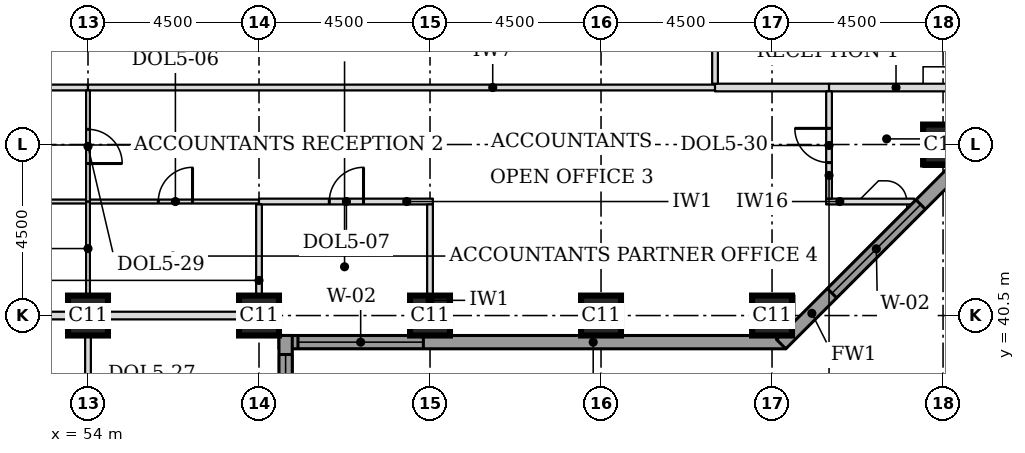
"""IFC4 building model, lengths in metres.
Left out: names, types, materials, properties, quantities, classifications, styles, units other than length and angle.
Written with IfcOpenShell. Run it as: python <this file> out.ifc"""

import sys

from ifc_helpers import new_model, si_unit, direction, frame, frame_2d, origin, origin_2d, place, context, subcontext, project, spatial, rectangle, extrude, element, fill, save


model = new_model("IFC4")
c1 = context("Model", 3, precision=1e-05, world=origin(), true_north=direction((0.0, 1.0)))
c2 = subcontext(c1, "Body", "Model", "MODEL_VIEW")
j1 = project(units=[si_unit("LENGTHUNIT", "METRE"), si_unit("PLANEANGLEUNIT", "RADIAN")], contexts=[c1])
p1 = place(None, origin())
s1 = spatial("IfcSite", under=j1, at=p1, CompositionType="ELEMENT")
p2 = place(p1, origin())
s2 = spatial("IfcBuilding", under=s1, at=p2, CompositionType="ELEMENT")
p3 = place(p2, frame((0.0, 0.0, 108.5)))
s3 = spatial("IfcBuildingStorey", under=s2, at=p3, CompositionType="ELEMENT", Elevation=108.5)
for number, where, z_axis, x_axis in (
    (1, (54.0, 40.5, 0.0), (0.0, 0.0, 1.0), (1.0, 0.0, 0.0)),
    (2, (58.5, 40.5, 0.0), (0.0, 0.0, 1.0), (1.0, 0.0, 0.0)),
    (3, (63.0, 40.5, 0.0), (0.0, 0.0, 1.0), (1.0, 0.0, 0.0)),
    (4, (67.5, 40.5, 0.0), (0.0, 0.0, 1.0), (1.0, 0.0, 0.0)),
    (5, (72.0, 40.5, 0.0), (0.0, 0.0, 1.0), (1.0, 0.0, 0.0)),
    (6, (76.5, 45.0, 0.0), (0.0, 0.0, 1.0), (1.0, 0.0, 0.0)),
):
    element("IfcColumn", number, at=place(p3, frame(where, z_axis=z_axis, x_axis=x_axis)), inside=s3, PredefinedType="COLUMN", context=c2, shape_type="SweptSolid", body=[
        extrude(rectangle(XDim=1.05, YDim=1.05, at=origin_2d()), origin(), (0.0, 0.0, 1.0), 3.7),
    ])
p4 = place(p3, frame((59.025, 39.8, 0.0), z_axis=(0.0, 0.0, 1.0), x_axis=(1.0, 0.0, 0.0)))
e7 = element("IfcWall", 7, at=p4, inside=s3, PredefinedType="STANDARD", context=c2, shape_type="SweptSolid", body=[
    extrude(rectangle(XDim=13.337, YDim=0.35, at=frame_2d((6.669, 0.0))), origin(), (0.0, 0.0, 1.0), 3.525),
])
p5 = place(p4, frame((0.5, 0.0, 0.9)))
e8 = element("IfcOpeningElement", 8, at=p5, cuts=e7, PredefinedType="OPENING", context=c2, shape_type="SweptSolid", body=[
    extrude(rectangle(XDim=3.3, YDim=1.9, at=frame_2d((1.65, 0.95))), frame((0.0, 0.185, 0.0), z_axis=(0.0, -1.0, 0.0), x_axis=(1.0, 0.0, 0.0)), (0.0, 0.0, 1.0), 0.37),
])
p6 = place(p3, frame((72.239, 39.749, 0.0), z_axis=(0.0, 0.0, 1.0), x_axis=(0.707106781187, 0.707106781187, 0.0)))
e9 = element("IfcWall", 9, at=p6, inside=s3, PredefinedType="STANDARD", context=c2, shape_type="SweptSolid", body=[
    extrude(rectangle(XDim=7.089, YDim=0.35, at=frame_2d((3.544, 0.0))), origin(), (0.0, 0.0, 1.0), 3.525),
])
p7 = place(p6, frame((1.894, 0.0, 0.9)))
e10 = element("IfcOpeningElement", 10, at=p7, cuts=e9, PredefinedType="OPENING", context=c2, shape_type="SweptSolid", body=[
    extrude(rectangle(XDim=3.3, YDim=1.9, at=frame_2d((1.65, 0.95))), frame((0.0, 0.185, 0.0), z_axis=(0.0, -1.0, 0.0), x_axis=(1.0, 0.0, 0.0)), (0.0, 0.0, 1.0), 0.37),
])
p8 = place(p3, frame((59.2, 22.138, 0.0), z_axis=(0.0, 0.0, 1.0), x_axis=(0.0, 1.0, 0.0)))
e11 = element("IfcWall", 11, at=p8, inside=s3, PredefinedType="STANDARD", context=c2, shape_type="SweptSolid", body=[
    extrude(rectangle(XDim=17.837, YDim=0.35, at=frame_2d((8.919, 0.0))), origin(), (0.0, 0.0, 1.0), 3.525),
])
p9 = place(p8, frame((5.462, 0.0, 0.9)))
e12 = element("IfcOpeningElement", 12, at=p9, cuts=e11, PredefinedType="OPENING", context=c2, shape_type="SweptSolid", body=[
    extrude(rectangle(XDim=3.3, YDim=1.9, at=frame_2d((1.65, 0.95))), frame((0.0, 0.185, 0.0), z_axis=(0.0, -1.0, 0.0), x_axis=(1.0, 0.0, 0.0)), (0.0, 0.0, 1.0), 0.37),
])
p10 = place(p8, frame((14.037, 0.0, 0.9)))
e13 = element("IfcOpeningElement", 13, at=p10, cuts=e11, PredefinedType="OPENING", context=c2, shape_type="SweptSolid", body=[
    extrude(rectangle(XDim=3.3, YDim=1.9, at=frame_2d((1.65, 0.95))), frame((0.0, 0.185, 0.0), z_axis=(0.0, -1.0, 0.0), x_axis=(1.0, 0.0, 0.0)), (0.0, 0.0, 1.0), 0.37),
])
p11 = place(p3, frame((50.015, 40.5, 0.0), z_axis=(0.0, 0.0, 1.0), x_axis=(1.0, 0.0, 0.0)))
e14 = element("IfcWall", 14, at=p11, inside=s3, PredefinedType="PARTITIONING", context=c2, shape_type="SweptSolid", body=[
    extrude(rectangle(XDim=3.46, YDim=0.2, at=frame_2d((1.73, 0.0))), origin(), (0.0, 0.0, 1.0), 2.8),
])
p12 = place(p3, frame((54.495, 40.5, 0.0), z_axis=(0.0, 0.0, 1.0), x_axis=(1.0, 0.0, 0.0)))
e15 = element("IfcWall", 15, at=p12, inside=s3, PredefinedType="PARTITIONING", context=c2, shape_type="SweptSolid", body=[
    extrude(rectangle(XDim=3.48, YDim=0.2, at=frame_2d((1.74, 0.0))), origin(), (0.0, 0.0, 1.0), 2.8),
])
p13 = place(p3, frame((49.575, 43.5, 0.0), z_axis=(0.0, 0.0, 1.0), x_axis=(1.0, 0.0, 0.0)))
e16 = element("IfcWall", 16, at=p13, inside=s3, PredefinedType="PARTITIONING", context=c2, shape_type="SweptSolid", body=[
    extrude(rectangle(XDim=4.375, YDim=0.1, at=frame_2d((2.188, 0.0))), origin(), (0.0, 0.0, 1.0), 3.55),
])
p14 = place(p13, frame((1.75, 0.0, 0.0)))
e17 = element("IfcOpeningElement", 17, at=p14, cuts=e16, PredefinedType="OPENING", context=c2, shape_type="SweptSolid", body=[
    extrude(rectangle(XDim=0.9, YDim=2.1, at=frame_2d((0.45, 1.05))), frame((0.0, 0.06, 0.0), z_axis=(0.0, -1.0, 0.0), x_axis=(1.0, 0.0, 0.0)), (0.0, 0.0, 1.0), 0.12),
])
p15 = place(p3, frame((54.05, 43.5, 0.0), z_axis=(0.0, 0.0, 1.0), x_axis=(1.0, 0.0, 0.0)))
e18 = element("IfcWall", 18, at=p15, inside=s3, PredefinedType="PARTITIONING", context=c2, shape_type="SweptSolid", body=[
    extrude(rectangle(XDim=4.45, YDim=0.1, at=frame_2d((2.225, 0.0))), origin(), (0.0, 0.0, 1.0), 3.55),
])
p16 = place(p15, frame((1.8, 0.0, 0.0)))
e19 = element("IfcOpeningElement", 19, at=p16, cuts=e18, PredefinedType="OPENING", context=c2, shape_type="SweptSolid", body=[
    extrude(rectangle(XDim=0.9, YDim=2.1, at=frame_2d((0.45, 1.05))), frame((0.0, 0.06, 0.0), z_axis=(0.0, -1.0, 0.0), x_axis=(1.0, 0.0, 0.0)), (0.0, 0.0, 1.0), 0.12),
])
p17 = place(p3, frame((58.5, 43.5, 0.0), z_axis=(0.0, 0.0, 1.0), x_axis=(1.0, 0.0, 0.0)))
e20 = element("IfcWall", 20, at=p17, inside=s3, PredefinedType="PARTITIONING", context=c2, shape_type="SweptSolid", body=[
    extrude(rectangle(XDim=4.575, YDim=0.15, at=frame_2d((2.288, 0.0))), origin(), (0.0, 0.0, 1.0), 3.55),
])
p18 = place(p17, frame((1.85, 0.0, 0.0)))
e21 = element("IfcOpeningElement", 21, at=p18, cuts=e20, PredefinedType="OPENING", context=c2, shape_type="SweptSolid", body=[
    extrude(rectangle(XDim=0.9, YDim=2.1, at=frame_2d((0.45, 1.05))), frame((0.0, 0.085, 0.0), z_axis=(0.0, -1.0, 0.0), x_axis=(1.0, 0.0, 0.0)), (0.0, 0.0, 1.0), 0.17),
])
p19 = place(p3, frame((73.425, 43.5, 0.0), z_axis=(0.0, 0.0, 1.0), x_axis=(1.0, 0.0, 0.0)))
e22 = element("IfcWall", 22, at=p19, inside=s3, PredefinedType="PARTITIONING", context=c2, shape_type="SweptSolid", body=[
    extrude(rectangle(XDim=2.317, YDim=0.15, at=frame_2d((1.159, 0.0))), origin(), (0.0, 0.0, 1.0), 3.55),
])
p20 = place(p3, frame((49.425, 46.5, 0.0), z_axis=(0.0, 0.0, 1.0), x_axis=(1.0, 0.0, 0.0)))
e23 = element("IfcWall", 23, at=p20, inside=s3, PredefinedType="PARTITIONING", context=c2, shape_type="SweptSolid", body=[
    extrude(rectangle(XDim=4.575, YDim=0.15, at=frame_2d((2.288, 0.0))), origin(), (0.0, 0.0, 1.0), 3.55),
])
p21 = place(p20, frame((1.8, 0.0, 0.0)))
e24 = element("IfcOpeningElement", 24, at=p21, cuts=e23, PredefinedType="OPENING", context=c2, shape_type="SweptSolid", body=[
    extrude(rectangle(XDim=1.0, YDim=2.1, at=frame_2d((0.5, 1.05))), frame((0.0, 0.085, 0.0), z_axis=(0.0, -1.0, 0.0), x_axis=(1.0, 0.0, 0.0)), (0.0, 0.0, 1.0), 0.17),
])
p22 = place(p3, frame((54.0, 46.5, 0.0), z_axis=(0.0, 0.0, 1.0), x_axis=(1.0, 0.0, 0.0)))
e25 = element("IfcWall", 25, at=p22, inside=s3, PredefinedType="PARTITIONING", context=c2, shape_type="SweptSolid", body=[
    extrude(rectangle(XDim=16.5, YDim=0.15, at=frame_2d((8.25, 0.0))), origin(), (0.0, 0.0, 1.0), 3.55),
])
p23 = place(p3, frame((70.5, 46.5, 0.0), z_axis=(0.0, 0.0, 1.0), x_axis=(1.0, 0.0, 0.0)))
e26 = element("IfcWall", 26, at=p23, inside=s3, PredefinedType="PARTITIONING", context=c2, shape_type="SweptSolid", body=[
    extrude(rectangle(XDim=3.0, YDim=0.2, at=frame_2d((1.5, 0.0))), origin(), (0.0, 0.0, 1.0), 3.55),
])
p24 = place(p3, frame((73.5, 46.5, 0.0), z_axis=(0.0, 0.0, 1.0), x_axis=(1.0, 0.0, 0.0)))
e27 = element("IfcWall", 27, at=p24, inside=s3, PredefinedType="PARTITIONING", context=c2, shape_type="SweptSolid", body=[
    extrude(rectangle(XDim=3.525, YDim=0.2, at=frame_2d((1.762, 0.0))), origin(), (0.0, 0.0, 1.0), 3.55),
])
p25 = place(p3, frame((54.0, 36.0, 0.0), z_axis=(0.0, 0.0, 1.0), x_axis=(0.0, 1.0, 0.0)))
e28 = element("IfcWall", 28, at=p25, inside=s3, PredefinedType="PARTITIONING", context=c2, shape_type="SweptSolid", body=[
    extrude(rectangle(XDim=3.975, YDim=0.15, at=frame_2d((1.988, 0.0))), origin(), (0.0, 0.0, 1.0), 3.55),
])
p26 = place(p25, frame((1.55, 0.0, 0.0)))
e29 = element("IfcOpeningElement", 29, at=p26, cuts=e28, PredefinedType="OPENING", context=c2, shape_type="SweptSolid", body=[
    extrude(rectangle(XDim=0.9, YDim=2.1, at=frame_2d((0.45, 1.05))), frame((0.0, 0.085, 0.0), z_axis=(0.0, -1.0, 0.0), x_axis=(1.0, 0.0, 0.0)), (0.0, 0.0, 1.0), 0.17),
])
p27 = place(p3, frame((63.0, 39.975, 0.0), z_axis=(0.0, 0.0, 1.0), x_axis=(0.0, 1.0, 0.0)))
e30 = element("IfcWall", 30, at=p27, inside=s3, PredefinedType="PARTITIONING", context=c2, shape_type="SweptSolid", body=[
    extrude(rectangle(XDim=3.45, YDim=0.15, at=frame_2d((1.725, 0.0))), origin(), (0.0, 0.0, 1.0), 3.55),
])
p28 = place(p3, frame((54.0, 41.025, 0.0), z_axis=(0.0, 0.0, 1.0), x_axis=(0.0, 1.0, 0.0)))
e31 = element("IfcWall", 31, at=p28, inside=s3, PredefinedType="PARTITIONING", context=c2, shape_type="SweptSolid", body=[
    extrude(rectangle(XDim=2.475, YDim=0.1, at=frame_2d((1.238, 0.0))), origin(), (0.0, 0.0, 1.0), 3.55),
])
p29 = place(p3, frame((58.5, 41.025, 0.0), z_axis=(0.0, 0.0, 1.0), x_axis=(0.0, 1.0, 0.0)))
e32 = element("IfcWall", 32, at=p29, inside=s3, PredefinedType="PARTITIONING", context=c2, shape_type="SweptSolid", body=[
    extrude(rectangle(XDim=2.4, YDim=0.15, at=frame_2d((1.2, 0.0))), origin(), (0.0, 0.0, 1.0), 3.55),
])
p30 = place(p3, frame((54.0, 43.5, 0.0), z_axis=(0.0, 0.0, 1.0), x_axis=(0.0, 1.0, 0.0)))
e33 = element("IfcWall", 33, at=p30, inside=s3, PredefinedType="PARTITIONING", context=c2, shape_type="SweptSolid", body=[
    extrude(rectangle(XDim=2.925, YDim=0.1, at=frame_2d((1.462, 0.0))), origin(), (0.0, 0.0, 1.0), 3.55),
])
p31 = place(p30, frame((1.0, 0.0, 0.0)))
e34 = element("IfcOpeningElement", 34, at=p31, cuts=e33, PredefinedType="OPENING", context=c2, shape_type="SweptSolid", body=[
    extrude(rectangle(XDim=0.9, YDim=2.1, at=frame_2d((0.45, 1.05))), frame((0.0, 0.06, 0.0), z_axis=(0.0, -1.0, 0.0), x_axis=(1.0, 0.0, 0.0)), (0.0, 0.0, 1.0), 0.12),
])
p32 = place(p3, frame((73.5, 43.575, 0.0), z_axis=(0.0, 0.0, 1.0), x_axis=(0.0, 1.0, 0.0)))
e35 = element("IfcWall", 35, at=p32, inside=s3, PredefinedType="PARTITIONING", context=c2, shape_type="SweptSolid", body=[
    extrude(rectangle(XDim=2.825, YDim=0.15, at=frame_2d((1.413, 0.0))), origin(), (0.0, 0.0, 1.0), 3.55),
])
p33 = place(p32, frame((0.95, 0.0, 0.0)))
e36 = element("IfcOpeningElement", 36, at=p33, cuts=e35, PredefinedType="OPENING", context=c2, shape_type="SweptSolid", body=[
    extrude(rectangle(XDim=0.9, YDim=2.1, at=frame_2d((0.45, 1.05))), frame((0.0, 0.085, 0.0), z_axis=(0.0, -1.0, 0.0), x_axis=(1.0, 0.0, 0.0)), (0.0, 0.0, 1.0), 0.17),
])
p34 = place(p3, frame((70.5, 46.6, 0.0), z_axis=(0.0, 0.0, 1.0), x_axis=(0.0, 1.0, 0.0)))
e37 = element("IfcWall", 37, at=p34, inside=s3, PredefinedType="PARTITIONING", context=c2, shape_type="SweptSolid", body=[
    extrude(rectangle(XDim=4.4, YDim=0.15, at=frame_2d((2.2, 0.0))), origin(), (0.0, 0.0, 1.0), 3.55),
])
p35 = place(p34, frame((1.7, 0.0, 0.0)))
e38 = element("IfcOpeningElement", 38, at=p35, cuts=e37, PredefinedType="OPENING", context=c2, shape_type="SweptSolid", body=[
    extrude(rectangle(XDim=1.0, YDim=2.1, at=frame_2d((0.5, 1.05))), frame((0.0, 0.085, 0.0), z_axis=(0.0, -1.0, 0.0), x_axis=(1.0, 0.0, 0.0)), (0.0, 0.0, 1.0), 0.17),
])
p36 = place(p5, origin())
e39 = element("IfcWindow", 39, at=p36, inside=s3, PartitioningType="SINGLE_PANEL", PredefinedType="WINDOW", context=c2, shape_type="SweptSolid", body=[
    extrude(rectangle(XDim=3.3, YDim=1.9, at=frame_2d((1.65, 0.95))), frame((0.0, 0.085, 0.0), z_axis=(0.0, -1.0, 0.0), x_axis=(1.0, 0.0, 0.0)), (0.0, 0.0, 1.0), 0.06),
])
fill(e8, e39)
p37 = place(p7, origin())
e40 = element("IfcWindow", 40, at=p37, inside=s3, PartitioningType="SINGLE_PANEL", PredefinedType="WINDOW", context=c2, shape_type="SweptSolid", body=[
    extrude(rectangle(XDim=3.3, YDim=1.9, at=frame_2d((1.65, 0.95))), frame((0.0, 0.085, 0.0), z_axis=(0.0, -1.0, 0.0), x_axis=(1.0, 0.0, 0.0)), (0.0, 0.0, 1.0), 0.06),
])
fill(e10, e40)
p38 = place(p10, origin())
e41 = element("IfcWindow", 41, at=p38, inside=s3, PartitioningType="SINGLE_PANEL", PredefinedType="WINDOW", context=c2, shape_type="SweptSolid", body=[
    extrude(rectangle(XDim=3.3, YDim=1.9, at=frame_2d((1.65, 0.95))), frame((0.0, 0.085, 0.0), z_axis=(0.0, -1.0, 0.0), x_axis=(1.0, 0.0, 0.0)), (0.0, 0.0, 1.0), 0.06),
])
fill(e13, e41)
p39 = place(p31, frame((0.9, 0.0, 0.0), z_axis=(0.0, 0.0, 1.0), x_axis=(-1.0, 0.0, 0.0)))
e42 = element("IfcDoor", 42, at=p39, inside=s3, OperationType="SINGLE_SWING_RIGHT", PredefinedType="DOOR", context=c2, shape_type="SweptSolid", body=[
    extrude(rectangle(XDim=0.9, YDim=2.1, at=frame_2d((0.45, 1.05))), frame((0.0, 0.025, 0.0), z_axis=(0.0, -1.0, 0.0), x_axis=(1.0, 0.0, 0.0)), (0.0, 0.0, 1.0), 0.05),
])
fill(e34, e42)
p40 = place(p16, origin())
e43 = element("IfcDoor", 43, at=p40, inside=s3, OperationType="SINGLE_SWING_RIGHT", PredefinedType="DOOR", context=c2, shape_type="SweptSolid", body=[
    extrude(rectangle(XDim=0.9, YDim=2.1, at=frame_2d((0.45, 1.05))), frame((0.0, 0.025, 0.0), z_axis=(0.0, -1.0, 0.0), x_axis=(1.0, 0.0, 0.0)), (0.0, 0.0, 1.0), 0.05),
])
fill(e19, e43)
p41 = place(p33, origin())
e44 = element("IfcDoor", 44, at=p41, inside=s3, OperationType="SINGLE_SWING_RIGHT", PredefinedType="DOOR", context=c2, shape_type="SweptSolid", body=[
    extrude(rectangle(XDim=0.9, YDim=2.1, at=frame_2d((0.45, 1.05))), frame((0.0, 0.025, 0.0), z_axis=(0.0, -1.0, 0.0), x_axis=(1.0, 0.0, 0.0)), (0.0, 0.0, 1.0), 0.05),
])
fill(e36, e44)
p42 = place(p18, origin())
e45 = element("IfcDoor", 45, at=p42, inside=s3, OperationType="SINGLE_SWING_RIGHT", PredefinedType="DOOR", context=c2, shape_type="SweptSolid", body=[
    extrude(rectangle(XDim=0.9, YDim=2.1, at=frame_2d((0.45, 1.05))), frame((0.0, 0.025, 0.0), z_axis=(0.0, -1.0, 0.0), x_axis=(1.0, 0.0, 0.0)), (0.0, 0.0, 1.0), 0.05),
])
fill(e21, e45)
save(model, sys.argv[1])
